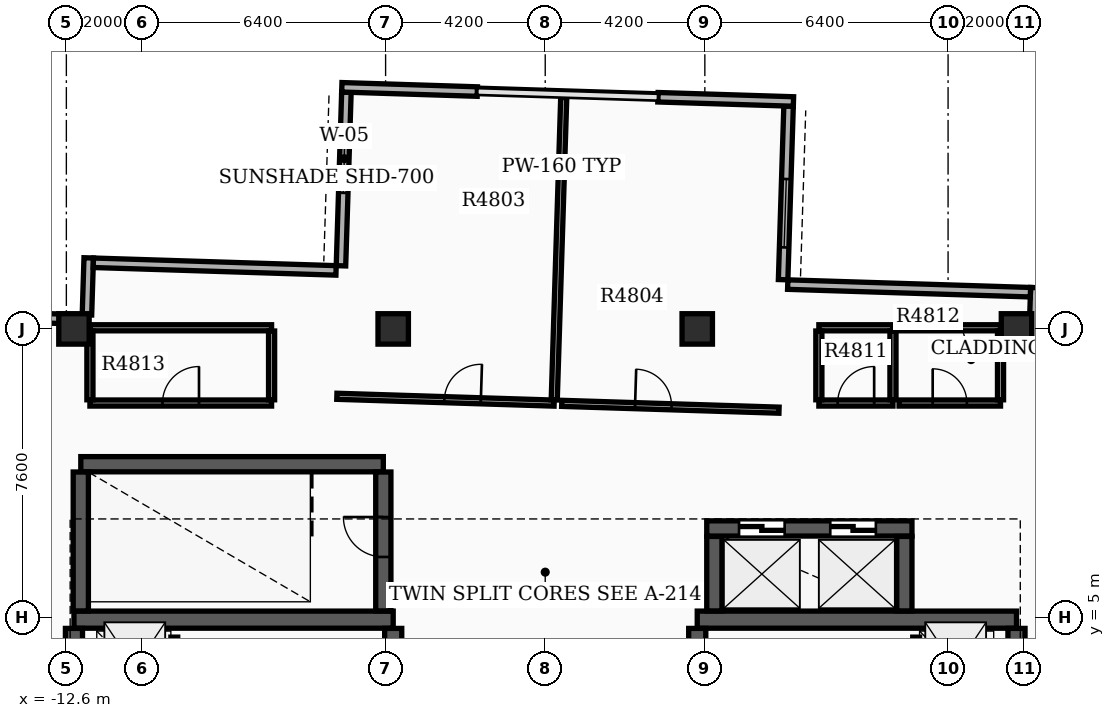
"""IFC4 building model, lengths in metres.
Left out: names, types, materials, properties, quantities, classifications, styles, units other than length and angle.
Written with IfcOpenShell. Run it as: python <this file> out.ifc"""

import sys

from ifc_helpers import new_model, si_unit, direction, frame, frame_2d, origin, origin_2d, place, context, subcontext, project, spatial, rectangle, extrude, element, fill, save


model = new_model("IFC4")
c1 = context("Model", 3, precision=1e-05, world=origin(), true_north=direction((0.0, 1.0)))
c2 = subcontext(c1, "Body", "Model", "MODEL_VIEW")
j1 = project(units=[si_unit("LENGTHUNIT", "METRE"), si_unit("PLANEANGLEUNIT", "RADIAN")], contexts=[c1])
p1 = place(None, origin())
s1 = spatial("IfcSite", under=j1, at=p1, CompositionType="ELEMENT")
p2 = place(p1, origin())
s2 = spatial("IfcBuilding", under=s1, at=p2, CompositionType="ELEMENT")
p3 = place(p2, frame((0.0, 0.0, 317.4)))
s3 = spatial("IfcBuildingStorey", under=s2, at=p3, CompositionType="ELEMENT", Elevation=317.4)
p4 = place(p3, frame((-12.4, 4.95, 0.0), z_axis=(0.0, 0.0, 1.0), x_axis=(1.0, 0.0, 0.0)))
e1 = element("IfcWall", 1, at=p4, inside=s3, PredefinedType="SHEAR", context=c2, shape_type="SweptSolid", body=[
    extrude(rectangle(XDim=8.4, YDim=0.45, at=frame_2d((4.2, 0.0))), origin(), (0.0, 0.0, 1.0), 4.25),
])
p5 = place(p3, frame((-12.4, -6.62, 0.0), z_axis=(0.0, 0.0, 1.0), x_axis=(0.0, 1.0, 0.0)))
e2 = element("IfcWall", 2, at=p5, inside=s3, PredefinedType="SHEAR", context=c2, shape_type="SweptSolid", body=[
    extrude(rectangle(XDim=11.34, YDim=0.45, at=frame_2d((5.67, 0.0))), origin(), (0.0, 0.0, 1.0), 4.25),
])
p6 = place(p3, frame((-4.0, -6.62, 0.0), z_axis=(0.0, 0.0, 1.0), x_axis=(0.0, 1.0, 0.0)))
e3 = element("IfcWall", 3, at=p6, inside=s3, PredefinedType="SHEAR", context=c2, shape_type="SweptSolid", body=[
    extrude(rectangle(XDim=11.34, YDim=0.45, at=frame_2d((5.67, 0.0))), origin(), (0.0, 0.0, 1.0), 4.25),
])
p7 = place(p6, frame((1.37, 0.0, 0.0)))
e4 = element("IfcOpeningElement", 4, at=p7, cuts=e3, PredefinedType="OPENING", context=c2, shape_type="SweptSolid", body=[
    extrude(rectangle(XDim=1.05, YDim=2.15, at=frame_2d((0.525, 1.075))), frame((0.0, 0.235, 0.0), z_axis=(0.0, -1.0, 0.0), x_axis=(1.0, 0.0, 0.0)), (0.0, 0.0, 1.0), 0.47),
])
p8 = place(p6, frame((6.97, 0.0, 0.0)))
e5 = element("IfcOpeningElement", 5, at=p8, cuts=e3, PredefinedType="OPENING", context=c2, shape_type="SweptSolid", body=[
    extrude(rectangle(XDim=1.05, YDim=2.15, at=frame_2d((0.525, 1.075))), frame((0.0, 0.235, 0.0), z_axis=(0.0, -1.0, 0.0), x_axis=(1.0, 0.0, 0.0)), (0.0, 0.0, 1.0), 0.47),
])
p9 = place(p3, frame((4.0, 4.95, 0.0), z_axis=(0.0, 0.0, 1.0), x_axis=(1.0, 0.0, 0.0)))
e6 = element("IfcWall", 6, at=p9, inside=s3, PredefinedType="SHEAR", context=c2, shape_type="SweptSolid", body=[
    extrude(rectangle(XDim=8.4, YDim=0.45, at=frame_2d((4.2, 0.0))), origin(), (0.0, 0.0, 1.0), 4.25),
])
p10 = place(p3, frame((4.0, -6.62, 0.0), z_axis=(0.0, 0.0, 1.0), x_axis=(0.0, 1.0, 0.0)))
e7 = element("IfcWall", 7, at=p10, inside=s3, PredefinedType="SHEAR", context=c2, shape_type="SweptSolid", body=[
    extrude(rectangle(XDim=11.34, YDim=0.45, at=frame_2d((5.67, 0.0))), origin(), (0.0, 0.0, 1.0), 4.25),
])
p11 = place(p10, frame((1.37, 0.0, 0.0)))
e8 = element("IfcOpeningElement", 8, at=p11, cuts=e7, PredefinedType="OPENING", context=c2, shape_type="SweptSolid", body=[
    extrude(rectangle(XDim=1.05, YDim=2.15, at=frame_2d((0.525, 1.075))), frame((0.0, 0.235, 0.0), z_axis=(0.0, -1.0, 0.0), x_axis=(1.0, 0.0, 0.0)), (0.0, 0.0, 1.0), 0.47),
])
p12 = place(p10, frame((6.97, 0.0, 0.0)))
e9 = element("IfcOpeningElement", 9, at=p12, cuts=e7, PredefinedType="OPENING", context=c2, shape_type="SweptSolid", body=[
    extrude(rectangle(XDim=1.05, YDim=2.15, at=frame_2d((0.525, 1.075))), frame((0.0, 0.235, 0.0), z_axis=(0.0, -1.0, 0.0), x_axis=(1.0, 0.0, 0.0)), (0.0, 0.0, 1.0), 0.47),
])
p13 = place(p3, frame((12.4, -6.62, 0.0), z_axis=(0.0, 0.0, 1.0), x_axis=(0.0, 1.0, 0.0)))
e10 = element("IfcWall", 10, at=p13, inside=s3, PredefinedType="SHEAR", context=c2, shape_type="SweptSolid", body=[
    extrude(rectangle(XDim=11.34, YDim=0.45, at=frame_2d((5.67, 0.0))), origin(), (0.0, 0.0, 1.0), 4.25),
])
p14 = place(p3, frame((-12.22, 9.04, 0.0), z_axis=(0.0, 0.0, 1.0), x_axis=(1.0, 0.0, 0.0)))
e11 = element("IfcWall", 11, at=p14, inside=s3, PredefinedType="SHEAR", context=c2, shape_type="SweptSolid", body=[
    extrude(rectangle(XDim=7.96, YDim=0.4, at=frame_2d((3.98, 0.0))), origin(), (0.0, 0.0, 1.0), 4.25),
])
p15 = place(p3, frame((-12.22, 5.18, 0.0), z_axis=(0.0, 0.0, 1.0), x_axis=(0.0, 1.0, 0.0)))
e12 = element("IfcWall", 12, at=p15, inside=s3, PredefinedType="SHEAR", context=c2, shape_type="SweptSolid", body=[
    extrude(rectangle(XDim=3.655, YDim=0.4, at=frame_2d((1.828, 0.0))), origin(), (0.0, 0.0, 1.0), 4.25),
])
p16 = place(p3, frame((-4.26, 5.18, 0.0), z_axis=(0.0, 0.0, 1.0), x_axis=(0.0, 1.0, 0.0)))
e13 = element("IfcWall", 13, at=p16, inside=s3, PredefinedType="SHEAR", context=c2, shape_type="SweptSolid", body=[
    extrude(rectangle(XDim=3.655, YDim=0.4, at=frame_2d((1.828, 0.0))), origin(), (0.0, 0.0, 1.0), 4.25),
])
p17 = place(p16, frame((1.42, 0.0, 0.0)))
e14 = element("IfcOpeningElement", 14, at=p17, cuts=e13, PredefinedType="OPENING", context=c2, shape_type="SweptSolid", body=[
    extrude(rectangle(XDim=1.05, YDim=2.15, at=frame_2d((0.525, 1.075))), frame((0.0, 0.21, 0.0), z_axis=(0.0, -1.0, 0.0), x_axis=(1.0, 0.0, 0.0)), (0.0, 0.0, 1.0), 0.42),
])
p18 = place(p3, frame((4.45, 5.18, 0.0), z_axis=(0.0, 0.0, 1.0), x_axis=(0.0, 1.0, 0.0)))
e15 = element("IfcWall", 15, at=p18, inside=s3, PredefinedType="SHEAR", context=c2, shape_type="SweptSolid", body=[
    extrude(rectangle(XDim=1.96, YDim=0.4, at=frame_2d((0.98, 0.0))), origin(), (0.0, 0.0, 1.0), 4.25),
])
p19 = place(p3, frame((4.25, 7.35, 0.0), z_axis=(0.0, 0.0, 1.0), x_axis=(1.0, 0.0, 0.0)))
e16 = element("IfcWall", 16, at=p19, inside=s3, PredefinedType="SHEAR", context=c2, shape_type="SweptSolid", body=[
    extrude(rectangle(XDim=5.4, YDim=0.4, at=frame_2d((2.7, 0.0))), origin(), (0.0, 0.0, 1.0), 4.25),
])
p20 = place(p19, frame((0.85, 0.0, 0.0)))
e17 = element("IfcOpeningElement", 17, at=p20, cuts=e16, PredefinedType="OPENING", context=c2, shape_type="SweptSolid", body=[
    extrude(rectangle(XDim=1.2, YDim=2.2, at=frame_2d((0.6, 1.1))), frame((0.0, 0.21, 0.0), z_axis=(0.0, -1.0, 0.0), x_axis=(1.0, 0.0, 0.0)), (0.0, 0.0, 1.0), 0.42),
])
p21 = place(p19, frame((3.25, 0.0, 0.0)))
e18 = element("IfcOpeningElement", 18, at=p21, cuts=e16, PredefinedType="OPENING", context=c2, shape_type="SweptSolid", body=[
    extrude(rectangle(XDim=1.2, YDim=2.2, at=frame_2d((0.6, 1.1))), frame((0.0, 0.21, 0.0), z_axis=(0.0, -1.0, 0.0), x_axis=(1.0, 0.0, 0.0)), (0.0, 0.0, 1.0), 0.42),
])
p22 = place(p3, frame((9.45, 5.18, 0.0), z_axis=(0.0, 0.0, 1.0), x_axis=(0.0, 1.0, 0.0)))
e19 = element("IfcWall", 19, at=p22, inside=s3, PredefinedType="SHEAR", context=c2, shape_type="SweptSolid", body=[
    extrude(rectangle(XDim=1.96, YDim=0.4, at=frame_2d((0.98, 0.0))), origin(), (0.0, 0.0, 1.0), 4.25),
])
for number, where, z_axis, x_axis in (
    (20, (12.4, 12.6, 0.0), (0.0, 0.0, 1.0), (1.0, 0.0, 0.0)),
    (21, (-12.4, 12.6, 0.0), (0.0, 0.0, 1.0), (1.0, 0.0, 0.0)),
    (22, (4.0, 12.6, 0.0), (0.0, 0.0, 1.0), (1.0, 0.0, 0.0)),
    (23, (-4.0, 12.6, 0.0), (0.0, 0.0, 1.0), (1.0, 0.0, 0.0)),
):
    element("IfcColumn", number, at=place(p3, frame(where, z_axis=z_axis, x_axis=x_axis)), inside=s3, PredefinedType="COLUMN", context=c2, shape_type="SweptSolid", body=[
        extrude(rectangle(XDim=0.8, YDim=0.8, at=origin_2d()), origin(), (0.0, 0.0, 1.0), 4.5),
    ])
p23 = place(p3, frame((6.26, 13.895, 0.0), z_axis=(0.0, 0.0, 1.0), x_axis=(0.031413213541, 0.999506483228, 0.0)))
e24 = element("IfcWall", 24, at=p23, inside=s3, PredefinedType="STANDARD", context=c2, shape_type="SweptSolid", body=[
    extrude(rectangle(XDim=4.57, YDim=0.25, at=frame_2d((2.285, 0.0))), origin(), (0.0, 0.0, 1.0), 3.73),
])
p24 = place(p23, frame((0.85, 0.0, 0.8)))
e25 = element("IfcOpeningElement", 25, at=p24, cuts=e24, PredefinedType="OPENING", context=c2, shape_type="SweptSolid", body=[
    extrude(rectangle(XDim=1.8, YDim=1.8, at=frame_2d((0.9, 0.9))), frame((0.0, 0.135, 0.0), z_axis=(0.0, -1.0, 0.0), x_axis=(1.0, 0.0, 0.0)), (0.0, 0.0, 1.0), 0.27),
])
p25 = place(p3, frame((-5.231, 18.829, 0.0), z_axis=(0.0, 0.0, 1.0), x_axis=(-0.031413213541, -0.999506483228, 0.0)))
e26 = element("IfcWall", 26, at=p25, inside=s3, PredefinedType="STANDARD", context=c2, shape_type="SweptSolid", body=[
    extrude(rectangle(XDim=4.57, YDim=0.25, at=frame_2d((2.285, 0.0))), origin(), (0.0, 0.0, 1.0), 3.73),
])
p26 = place(p25, frame((0.85, 0.0, 0.8)))
e27 = element("IfcOpeningElement", 27, at=p26, cuts=e26, PredefinedType="OPENING", context=c2, shape_type="SweptSolid", body=[
    extrude(rectangle(XDim=1.8, YDim=1.8, at=frame_2d((0.9, 0.9))), frame((0.0, 0.135, 0.0), z_axis=(0.0, -1.0, 0.0), x_axis=(1.0, 0.0, 0.0)), (0.0, 0.0, 1.0), 0.27),
])
p27 = place(p3, frame((6.532, 18.584, 0.0), z_axis=(0.0, 0.0, 1.0), x_axis=(-0.999506383634, 0.031416382256, 0.0)))
e28 = element("IfcWall", 28, at=p27, inside=s3, PredefinedType="STANDARD", context=c2, shape_type="SweptSolid", body=[
    extrude(rectangle(XDim=3.567, YDim=0.25, at=frame_2d((1.783, 0.0))), origin(), (0.0, 0.0, 1.0), 3.73),
])
p28 = place(p3, frame((-1.787, 18.845, 0.0), z_axis=(0.0, 0.0, 1.0), x_axis=(-0.999506451182, 0.031414233162, 0.0)))
e29 = element("IfcWall", 29, at=p28, inside=s3, PredefinedType="STANDARD", context=c2, shape_type="SweptSolid", body=[
    extrude(rectangle(XDim=3.567, YDim=0.25, at=frame_2d((1.784, 0.0))), origin(), (0.0, 0.0, 1.0), 3.73),
])
p29 = place(p3, frame((12.849, 12.188, 0.0), z_axis=(0.0, 0.0, 1.0), x_axis=(0.031412596484, 0.999506502621, 0.0)))
e30 = element("IfcWall", 30, at=p29, inside=s3, PredefinedType="STANDARD", context=c2, shape_type="SweptSolid", body=[
    extrude(rectangle(XDim=1.5, YDim=0.25, at=frame_2d((0.75, 0.0))), origin(), (0.0, 0.0, 1.0), 3.73),
])
p30 = place(p3, frame((12.767, 13.566, 0.0), z_axis=(0.0, 0.0, 1.0), x_axis=(-0.999506693648, 0.031406517667, 0.0)))
e31 = element("IfcWall", 31, at=p30, inside=s3, PredefinedType="STANDARD", context=c2, shape_type="SweptSolid", body=[
    extrude(rectangle(XDim=6.39, YDim=0.25, at=frame_2d((3.195, 0.0))), origin(), (0.0, 0.0, 1.0), 3.73),
])
p31 = place(p3, frame((-13.437, 12.888, 0.0), z_axis=(0.0, 0.0, 1.0), x_axis=(0.999505383482, -0.0314481858, 0.0)))
e32 = element("IfcWall", 32, at=p31, inside=s3, PredefinedType="STANDARD", context=c2, shape_type="SweptSolid", body=[
    extrude(rectangle(XDim=1.25, YDim=0.25, at=frame_2d((0.625, 0.0))), origin(), (0.0, 0.0, 1.0), 3.73),
])
p32 = place(p3, frame((-12.059, 12.97, 0.0), z_axis=(0.0, 0.0, 1.0), x_axis=(0.031412596484, 0.999506502621, 0.0)))
e33 = element("IfcWall", 33, at=p32, inside=s3, PredefinedType="STANDARD", context=c2, shape_type="SweptSolid", body=[
    extrude(rectangle(XDim=1.5, YDim=0.25, at=frame_2d((0.75, 0.0))), origin(), (0.0, 0.0, 1.0), 3.73),
])
p33 = place(p3, frame((-11.89, 14.341, 0.0), z_axis=(0.0, 0.0, 1.0), x_axis=(0.999506693648, -0.031406517667, 0.0)))
e34 = element("IfcWall", 34, at=p33, inside=s3, PredefinedType="STANDARD", context=c2, shape_type="SweptSolid", body=[
    extrude(rectangle(XDim=6.39, YDim=0.25, at=frame_2d((3.195, 0.0))), origin(), (0.0, 0.0, 1.0), 3.73),
])
for number, where, z_axis, x_axis in (
    (35, (-9.76, 2.5, 0.0), (0.0, 0.0, 1.0), (0.0, 1.0, 0.0)),
    (36, (9.76, 2.5, 0.0), (0.0, 0.0, 1.0), (0.0, 1.0, 0.0)),
):
    element("IfcWall", number, at=place(p3, frame(where, z_axis=z_axis, x_axis=x_axis)), inside=s3, PredefinedType="SOLIDWALL", context=c2, shape_type="SweptSolid", body=[
        extrude(rectangle(XDim=1.99, YDim=0.18, at=frame_2d((0.995, 0.0))), origin(), (0.0, 0.0, 1.0), 3.72),
    ])
p34 = place(p3, frame((-5.483, 10.828, 0.0), z_axis=(0.0, 0.0, 1.0), x_axis=(0.999506480363, -0.031413304704, 0.0)))
e37 = element("IfcWall", 37, at=p34, inside=s3, PredefinedType="PARTITIONING", context=c2, shape_type="SweptSolid", body=[
    extrude(rectangle(XDim=5.72, YDim=0.16, at=frame_2d((2.86, 0.0))), origin(), (0.0, 0.0, 1.0), 3.72),
])
p35 = place(p34, frame((2.83, 0.0, 0.0)))
e38 = element("IfcOpeningElement", 38, at=p35, cuts=e37, PredefinedType="OPENING", context=c2, shape_type="SweptSolid", body=[
    extrude(rectangle(XDim=0.96, YDim=2.15, at=frame_2d((0.48, 1.075))), frame((0.0, 0.09, 0.0), z_axis=(0.0, -1.0, 0.0), x_axis=(1.0, 0.0, 0.0)), (0.0, 0.0, 1.0), 0.18),
])
p36 = place(p3, frame((0.237, 10.733, 0.0), z_axis=(0.0, 0.0, 1.0), x_axis=(0.031407107994, 0.999506675099, 0.0)))
e39 = element("IfcWall", 39, at=p36, inside=s3, PredefinedType="PARTITIONING", context=c2, shape_type="SweptSolid", body=[
    extrude(rectangle(XDim=7.96, YDim=0.16, at=frame_2d((3.98, 0.0))), origin(), (0.0, 0.0, 1.0), 3.72),
])
p37 = place(p3, frame((0.435, 10.642, 0.0), z_axis=(0.0, 0.0, 1.0), x_axis=(0.999506438243, -0.031414644854, 0.0)))
e40 = element("IfcWall", 40, at=p37, inside=s3, PredefinedType="PARTITIONING", context=c2, shape_type="SweptSolid", body=[
    extrude(rectangle(XDim=5.72, YDim=0.16, at=frame_2d((2.86, 0.0))), origin(), (0.0, 0.0, 1.0), 3.72),
])
p38 = place(p37, frame((1.93, 0.0, 0.0)))
e41 = element("IfcOpeningElement", 41, at=p38, cuts=e40, PredefinedType="OPENING", context=c2, shape_type="SweptSolid", body=[
    extrude(rectangle(XDim=0.96, YDim=2.15, at=frame_2d((0.48, 1.075))), frame((0.0, 0.09, 0.0), z_axis=(0.0, -1.0, 0.0), x_axis=(1.0, 0.0, 0.0)), (0.0, 0.0, 1.0), 0.18),
])
p39 = place(p3, frame((7.2, 10.65, 0.0), z_axis=(0.0, 0.0, 1.0), x_axis=(1.0, 0.0, 0.0)))
e42 = element("IfcWall", 42, at=p39, inside=s3, PredefinedType="PARTITIONING", context=c2, shape_type="SweptSolid", body=[
    extrude(rectangle(XDim=1.95, YDim=0.16, at=frame_2d((0.975, 0.0))), origin(), (0.0, 0.0, 1.0), 3.72),
])
p40 = place(p39, frame((0.495, 0.0, 0.0)))
e43 = element("IfcOpeningElement", 43, at=p40, cuts=e42, PredefinedType="OPENING", context=c2, shape_type="SweptSolid", body=[
    extrude(rectangle(XDim=0.96, YDim=2.15, at=frame_2d((0.48, 1.075))), frame((0.0, 0.09, 0.0), z_axis=(0.0, -1.0, 0.0), x_axis=(1.0, 0.0, 0.0)), (0.0, 0.0, 1.0), 0.18),
])
p41 = place(p3, frame((7.2, 12.63, 0.0), z_axis=(0.0, 0.0, 1.0), x_axis=(1.0, 0.0, 0.0)))
e44 = element("IfcWall", 44, at=p41, inside=s3, PredefinedType="PARTITIONING", context=c2, shape_type="SweptSolid", body=[
    extrude(rectangle(XDim=1.95, YDim=0.16, at=frame_2d((0.975, 0.0))), origin(), (0.0, 0.0, 1.0), 3.72),
])
for number, where, z_axis, x_axis in (
    (45, (7.2, 10.735, 0.0), (0.0, 0.0, 1.0), (0.0, 1.0, 0.0)),
    (46, (9.15, 10.735, 0.0), (0.0, 0.0, 1.0), (0.0, 1.0, 0.0)),
):
    element("IfcWall", number, at=place(p3, frame(where, z_axis=z_axis, x_axis=x_axis)), inside=s3, PredefinedType="PARTITIONING", context=c2, shape_type="SweptSolid", body=[
        extrude(rectangle(XDim=1.81, YDim=0.16, at=frame_2d((0.905, 0.0))), origin(), (0.0, 0.0, 1.0), 3.72),
    ])
p42 = place(p3, frame((9.31, 10.65, 0.0), z_axis=(0.0, 0.0, 1.0), x_axis=(1.0, 0.0, 0.0)))
e47 = element("IfcWall", 47, at=p42, inside=s3, PredefinedType="PARTITIONING", context=c2, shape_type="SweptSolid", body=[
    extrude(rectangle(XDim=2.67, YDim=0.16, at=frame_2d((1.335, 0.0))), origin(), (0.0, 0.0, 1.0), 3.72),
])
p43 = place(p42, frame((0.885, 0.0, 0.0)))
e48 = element("IfcOpeningElement", 48, at=p43, cuts=e47, PredefinedType="OPENING", context=c2, shape_type="SweptSolid", body=[
    extrude(rectangle(XDim=0.9, YDim=2.15, at=frame_2d((0.45, 1.075))), frame((0.0, 0.09, 0.0), z_axis=(0.0, -1.0, 0.0), x_axis=(1.0, 0.0, 0.0)), (0.0, 0.0, 1.0), 0.18),
])
p44 = place(p3, frame((9.31, 12.63, 0.0), z_axis=(0.0, 0.0, 1.0), x_axis=(1.0, 0.0, 0.0)))
e49 = element("IfcWall", 49, at=p44, inside=s3, PredefinedType="PARTITIONING", context=c2, shape_type="SweptSolid", body=[
    extrude(rectangle(XDim=2.67, YDim=0.16, at=frame_2d((1.335, 0.0))), origin(), (0.0, 0.0, 1.0), 3.72),
])
p45 = place(p3, frame((11.98, 10.735, 0.0), z_axis=(0.0, 0.0, 1.0), x_axis=(0.0, 1.0, 0.0)))
e50 = element("IfcWall", 50, at=p45, inside=s3, PredefinedType="PARTITIONING", context=c2, shape_type="SweptSolid", body=[
    extrude(rectangle(XDim=1.81, YDim=0.16, at=frame_2d((0.905, 0.0))), origin(), (0.0, 0.0, 1.0), 3.72),
])
p46 = place(p3, frame((-11.98, 10.65, 0.0), z_axis=(0.0, 0.0, 1.0), x_axis=(1.0, 0.0, 0.0)))
e51 = element("IfcWall", 51, at=p46, inside=s3, PredefinedType="PARTITIONING", context=c2, shape_type="SweptSolid", body=[
    extrude(rectangle(XDim=4.78, YDim=0.16, at=frame_2d((2.39, 0.0))), origin(), (0.0, 0.0, 1.0), 3.72),
])
p47 = place(p46, frame((1.91, 0.0, 0.0)))
e52 = element("IfcOpeningElement", 52, at=p47, cuts=e51, PredefinedType="OPENING", context=c2, shape_type="SweptSolid", body=[
    extrude(rectangle(XDim=0.96, YDim=2.15, at=frame_2d((0.48, 1.075))), frame((0.0, 0.09, 0.0), z_axis=(0.0, -1.0, 0.0), x_axis=(1.0, 0.0, 0.0)), (0.0, 0.0, 1.0), 0.18),
])
p48 = place(p3, frame((-11.98, 12.63, 0.0), z_axis=(0.0, 0.0, 1.0), x_axis=(1.0, 0.0, 0.0)))
e53 = element("IfcWall", 53, at=p48, inside=s3, PredefinedType="PARTITIONING", context=c2, shape_type="SweptSolid", body=[
    extrude(rectangle(XDim=4.78, YDim=0.16, at=frame_2d((2.39, 0.0))), origin(), (0.0, 0.0, 1.0), 3.72),
])
for number, where, z_axis, x_axis in (
    (54, (-11.98, 10.735, 0.0), (0.0, 0.0, 1.0), (0.0, 1.0, 0.0)),
    (55, (-7.2, 10.735, 0.0), (0.0, 0.0, 1.0), (0.0, 1.0, 0.0)),
):
    element("IfcWall", number, at=place(p3, frame(where, z_axis=z_axis, x_axis=x_axis)), inside=s3, PredefinedType="PARTITIONING", context=c2, shape_type="SweptSolid", body=[
        extrude(rectangle(XDim=1.81, YDim=0.16, at=frame_2d((0.905, 0.0))), origin(), (0.0, 0.0, 1.0), 3.72),
    ])
p49 = place(p24, origin())
e56 = element("IfcWindow", 56, at=p49, inside=s3, PartitioningType="SINGLE_PANEL", PredefinedType="WINDOW", context=c2, shape_type="SweptSolid", body=[
    extrude(rectangle(XDim=1.8, YDim=1.8, at=frame_2d((0.9, 0.9))), frame((0.0, 0.03, 0.0), z_axis=(0.0, -1.0, 0.0), x_axis=(1.0, 0.0, 0.0)), (0.0, 0.0, 1.0), 0.06),
])
fill(e25, e56)
p50 = place(p26, origin())
e57 = element("IfcWindow", 57, at=p50, inside=s3, PartitioningType="SINGLE_PANEL", PredefinedType="WINDOW", context=c2, shape_type="SweptSolid", body=[
    extrude(rectangle(XDim=1.8, YDim=1.8, at=frame_2d((0.9, 0.9))), frame((0.0, 0.03, 0.0), z_axis=(0.0, -1.0, 0.0), x_axis=(1.0, 0.0, 0.0)), (0.0, 0.0, 1.0), 0.06),
])
fill(e27, e57)
p51 = place(p17, origin())
e58 = element("IfcDoor", 58, at=p51, inside=s3, OperationType="SINGLE_SWING_RIGHT", PredefinedType="DOOR", context=c2, shape_type="SweptSolid", body=[
    extrude(rectangle(XDim=1.05, YDim=2.15, at=frame_2d((0.525, 1.075))), frame((0.0, 0.025, 0.0), z_axis=(0.0, -1.0, 0.0), x_axis=(1.0, 0.0, 0.0)), (0.0, 0.0, 1.0), 0.05),
])
fill(e14, e58)
p52 = place(p20, origin())
e59 = element("IfcDoor", 59, at=p52, inside=s3, OperationType="DOUBLE_DOOR_SLIDING", PredefinedType="DOOR", context=c2, shape_type="SweptSolid", body=[
    extrude(rectangle(XDim=1.2, YDim=2.2, at=frame_2d((0.6, 1.1))), frame((0.0, 0.025, 0.0), z_axis=(0.0, -1.0, 0.0), x_axis=(1.0, 0.0, 0.0)), (0.0, 0.0, 1.0), 0.05),
])
fill(e17, e59)
p53 = place(p21, origin())
e60 = element("IfcDoor", 60, at=p53, inside=s3, OperationType="DOUBLE_DOOR_SLIDING", PredefinedType="DOOR", context=c2, shape_type="SweptSolid", body=[
    extrude(rectangle(XDim=1.2, YDim=2.2, at=frame_2d((0.6, 1.1))), frame((0.0, 0.025, 0.0), z_axis=(0.0, -1.0, 0.0), x_axis=(1.0, 0.0, 0.0)), (0.0, 0.0, 1.0), 0.05),
])
fill(e18, e60)
p54 = place(p35, origin())
e61 = element("IfcDoor", 61, at=p54, inside=s3, OperationType="SINGLE_SWING_RIGHT", PredefinedType="DOOR", context=c2, shape_type="SweptSolid", body=[
    extrude(rectangle(XDim=0.96, YDim=2.15, at=frame_2d((0.48, 1.075))), frame((0.0, 0.025, 0.0), z_axis=(0.0, -1.0, 0.0), x_axis=(1.0, 0.0, 0.0)), (0.0, 0.0, 1.0), 0.05),
])
fill(e38, e61)
p55 = place(p38, origin())
e62 = element("IfcDoor", 62, at=p55, inside=s3, OperationType="SINGLE_SWING_LEFT", PredefinedType="DOOR", context=c2, shape_type="SweptSolid", body=[
    extrude(rectangle(XDim=0.96, YDim=2.15, at=frame_2d((0.48, 1.075))), frame((0.0, 0.025, 0.0), z_axis=(0.0, -1.0, 0.0), x_axis=(1.0, 0.0, 0.0)), (0.0, 0.0, 1.0), 0.05),
])
fill(e41, e62)
p56 = place(p40, origin())
e63 = element("IfcDoor", 63, at=p56, inside=s3, OperationType="SINGLE_SWING_RIGHT", PredefinedType="DOOR", context=c2, shape_type="SweptSolid", body=[
    extrude(rectangle(XDim=0.96, YDim=2.15, at=frame_2d((0.48, 1.075))), frame((0.0, 0.025, 0.0), z_axis=(0.0, -1.0, 0.0), x_axis=(1.0, 0.0, 0.0)), (0.0, 0.0, 1.0), 0.05),
])
fill(e43, e63)
p57 = place(p43, origin())
e64 = element("IfcDoor", 64, at=p57, inside=s3, OperationType="SINGLE_SWING_LEFT", PredefinedType="DOOR", context=c2, shape_type="SweptSolid", body=[
    extrude(rectangle(XDim=0.9, YDim=2.15, at=frame_2d((0.45, 1.075))), frame((0.0, 0.025, 0.0), z_axis=(0.0, -1.0, 0.0), x_axis=(1.0, 0.0, 0.0)), (0.0, 0.0, 1.0), 0.05),
])
fill(e48, e64)
p58 = place(p47, origin())
e65 = element("IfcDoor", 65, at=p58, inside=s3, OperationType="SINGLE_SWING_RIGHT", PredefinedType="DOOR", context=c2, shape_type="SweptSolid", body=[
    extrude(rectangle(XDim=0.96, YDim=2.15, at=frame_2d((0.48, 1.075))), frame((0.0, 0.025, 0.0), z_axis=(0.0, -1.0, 0.0), x_axis=(1.0, 0.0, 0.0)), (0.0, 0.0, 1.0), 0.05),
])
fill(e52, e65)
save(model, sys.argv[1])
